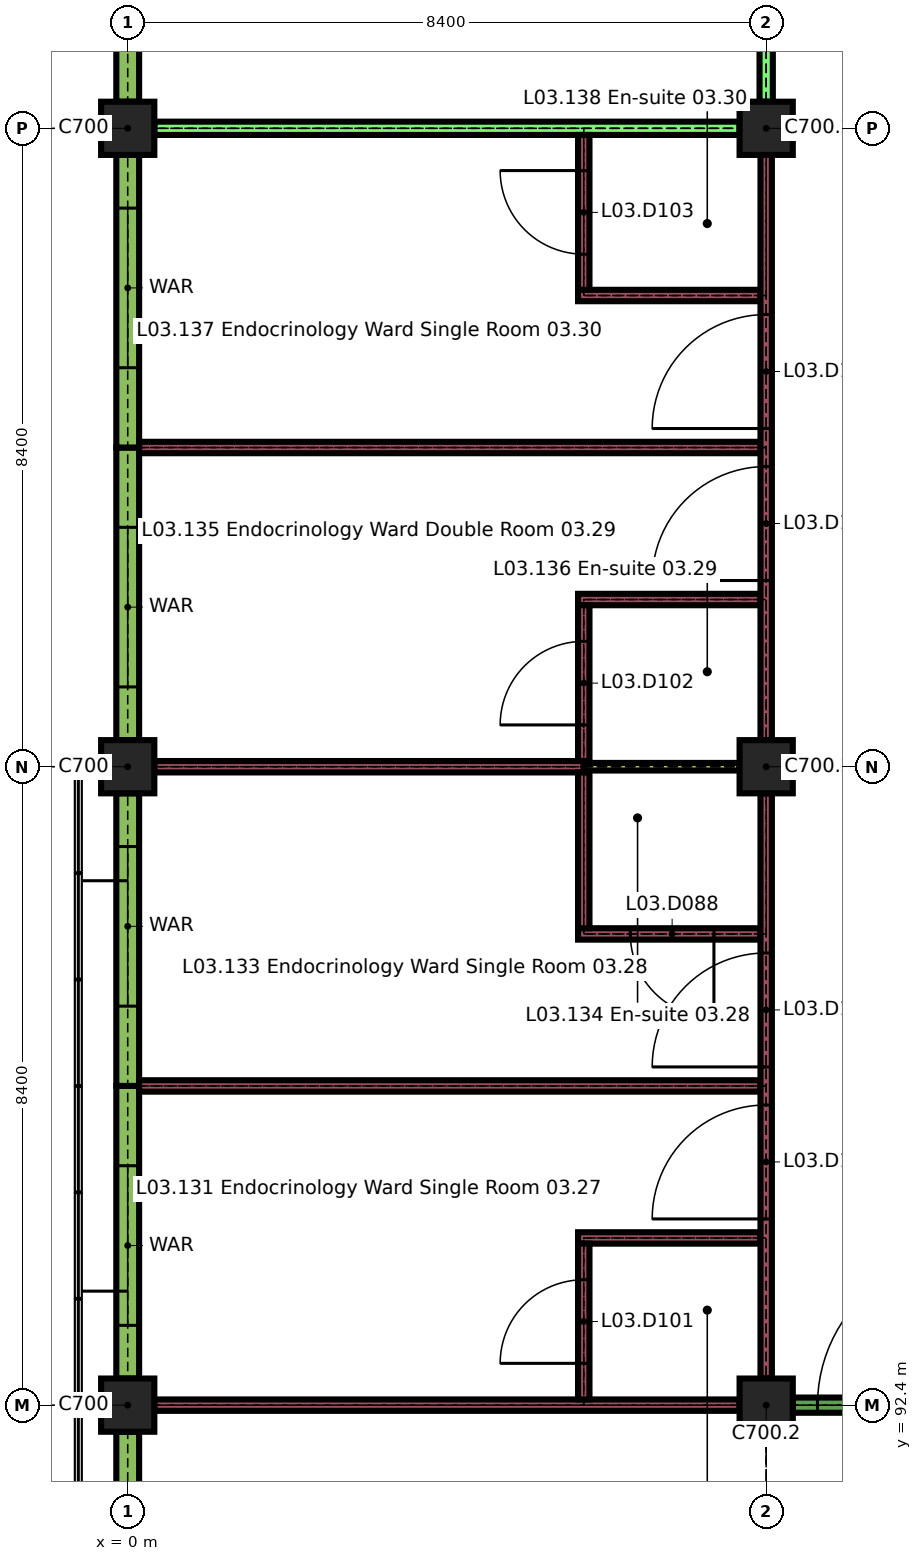
"""IFC4 building model, lengths in metres.
Left out: names, types, materials, properties, quantities, classifications, styles, units other than length and angle.
Written with IfcOpenShell. Run it as: python <this file> out.ifc"""

import sys

from ifc_helpers import new_model, si_unit, direction, frame, frame_2d, origin, origin_2d, place, context, subcontext, project, spatial, rectangle, extrude, element, fill, save


model = new_model("IFC4")
c1 = context("Model", 3, precision=1e-05, world=origin(), true_north=direction((0.0, 1.0)))
c2 = subcontext(c1, "Body", "Model", "MODEL_VIEW")
j1 = project(units=[si_unit("LENGTHUNIT", "METRE"), si_unit("PLANEANGLEUNIT", "RADIAN")], contexts=[c1])
p1 = place(None, origin())
s1 = spatial("IfcSite", under=j1, at=p1, CompositionType="ELEMENT")
p2 = place(p1, origin())
s2 = spatial("IfcBuilding", under=s1, at=p2, CompositionType="ELEMENT")
p3 = place(p2, frame((0.0, 0.0, 15.3)))
s3 = spatial("IfcBuildingStorey", under=s2, at=p3, CompositionType="ELEMENT", Elevation=15.3)
for number, where, z_axis, x_axis in (
    (1, (0.0, 92.4, 0.0), (0.0, 0.0, 1.0), (1.0, 0.0, 0.0)),
    (2, (8.4, 92.4, 0.0), (0.0, 0.0, 1.0), (1.0, 0.0, 0.0)),
    (3, (0.0, 100.8, 0.0), (0.0, 0.0, 1.0), (1.0, 0.0, 0.0)),
    (4, (8.4, 100.8, 0.0), (0.0, 0.0, 1.0), (1.0, 0.0, 0.0)),
    (5, (0.0, 109.2, 0.0), (0.0, 0.0, 1.0), (1.0, 0.0, 0.0)),
    (6, (8.4, 109.2, 0.0), (0.0, 0.0, 1.0), (1.0, 0.0, 0.0)),
):
    element("IfcColumn", number, at=place(p3, frame(where, z_axis=z_axis, x_axis=x_axis)), inside=s3, PredefinedType="COLUMN", context=c2, shape_type="SweptSolid", body=[
        extrude(rectangle(XDim=0.7, YDim=0.7, at=origin_2d()), origin(), (0.0, 0.0, 1.0), 3.26),
    ])
p4 = place(p3, frame((0.0, 91.0, 0.0), z_axis=(0.0, 0.0, 1.0), x_axis=(0.0, 1.0, 0.0)))
e7 = element("IfcWall", 7, at=p4, inside=s3, PredefinedType="SOLIDWALL", context=c2, shape_type="SweptSolid", body=[
    extrude(rectangle(XDim=1.05, YDim=0.3, at=frame_2d((0.525, 0.0))), origin(), (0.0, 0.0, 1.0), 2.96),
])
p5 = place(p3, frame((0.0, 92.75, 0.0), z_axis=(0.0, 0.0, 1.0), x_axis=(0.0, 1.0, 0.0)))
e8 = element("IfcWall", 8, at=p5, inside=s3, PredefinedType="SOLIDWALL", context=c2, shape_type="SweptSolid", body=[
    extrude(rectangle(XDim=3.85, YDim=0.3, at=frame_2d((1.925, 0.0))), origin(), (0.0, 0.0, 1.0), 2.96),
])
p6 = place(p5, frame((0.7, 0.0, 0.9)))
e9 = element("IfcOpeningElement", 9, at=p6, cuts=e8, PredefinedType="OPENING", context=c2, shape_type="SweptSolid", body=[
    extrude(rectangle(XDim=2.1, YDim=1.5, at=frame_2d((1.05, 0.75))), frame((0.0, 0.16, 0.0), z_axis=(0.0, -1.0, 0.0), x_axis=(1.0, 0.0, 0.0)), (0.0, 0.0, 1.0), 0.32),
])
p7 = place(p3, frame((0.0, 96.6, 0.0), z_axis=(0.0, 0.0, 1.0), x_axis=(0.0, 1.0, 0.0)))
e10 = element("IfcWall", 10, at=p7, inside=s3, PredefinedType="SOLIDWALL", context=c2, shape_type="SweptSolid", body=[
    extrude(rectangle(XDim=3.85, YDim=0.3, at=frame_2d((1.925, 0.0))), origin(), (0.0, 0.0, 1.0), 2.96),
])
p8 = place(p7, frame((1.05, 0.0, 0.9)))
e11 = element("IfcOpeningElement", 11, at=p8, cuts=e10, PredefinedType="OPENING", context=c2, shape_type="SweptSolid", body=[
    extrude(rectangle(XDim=2.1, YDim=1.5, at=frame_2d((1.05, 0.75))), frame((0.0, 0.16, 0.0), z_axis=(0.0, -1.0, 0.0), x_axis=(1.0, 0.0, 0.0)), (0.0, 0.0, 1.0), 0.32),
])
p9 = place(p3, frame((0.0, 101.15, 0.0), z_axis=(0.0, 0.0, 1.0), x_axis=(0.0, 1.0, 0.0)))
e12 = element("IfcWall", 12, at=p9, inside=s3, PredefinedType="SOLIDWALL", context=c2, shape_type="SweptSolid", body=[
    extrude(rectangle(XDim=3.85, YDim=0.3, at=frame_2d((1.925, 0.0))), origin(), (0.0, 0.0, 1.0), 2.96),
])
p10 = place(p9, frame((0.7, 0.0, 0.9)))
e13 = element("IfcOpeningElement", 13, at=p10, cuts=e12, PredefinedType="OPENING", context=c2, shape_type="SweptSolid", body=[
    extrude(rectangle(XDim=2.1, YDim=1.5, at=frame_2d((1.05, 0.75))), frame((0.0, 0.16, 0.0), z_axis=(0.0, -1.0, 0.0), x_axis=(1.0, 0.0, 0.0)), (0.0, 0.0, 1.0), 0.32),
])
p11 = place(p3, frame((0.0, 105.0, 0.0), z_axis=(0.0, 0.0, 1.0), x_axis=(0.0, 1.0, 0.0)))
e14 = element("IfcWall", 14, at=p11, inside=s3, PredefinedType="SOLIDWALL", context=c2, shape_type="SweptSolid", body=[
    extrude(rectangle(XDim=3.85, YDim=0.3, at=frame_2d((1.925, 0.0))), origin(), (0.0, 0.0, 1.0), 2.96),
])
p12 = place(p11, frame((1.05, 0.0, 0.9)))
e15 = element("IfcOpeningElement", 15, at=p12, cuts=e14, PredefinedType="OPENING", context=c2, shape_type="SweptSolid", body=[
    extrude(rectangle(XDim=2.1, YDim=1.5, at=frame_2d((1.05, 0.75))), frame((0.0, 0.16, 0.0), z_axis=(0.0, -1.0, 0.0), x_axis=(1.0, 0.0, 0.0)), (0.0, 0.0, 1.0), 0.32),
])
p13 = place(p3, frame((0.0, 109.55, 0.0), z_axis=(0.0, 0.0, 1.0), x_axis=(0.0, 1.0, 0.0)))
e16 = element("IfcWall", 16, at=p13, inside=s3, PredefinedType="SOLIDWALL", context=c2, shape_type="SweptSolid", body=[
    extrude(rectangle(XDim=3.85, YDim=0.3, at=frame_2d((1.925, 0.0))), origin(), (0.0, 0.0, 1.0), 2.96),
])
p14 = place(p13, frame((1.0, 0.0, 0.9)))
e17 = element("IfcOpeningElement", 17, at=p14, cuts=e16, PredefinedType="OPENING", context=c2, shape_type="SweptSolid", body=[
    extrude(rectangle(XDim=1.5, YDim=1.5, at=frame_2d((0.75, 0.75))), frame((0.0, 0.16, 0.0), z_axis=(0.0, -1.0, 0.0), x_axis=(1.0, 0.0, 0.0)), (0.0, 0.0, 1.0), 0.32),
])
p15 = place(p3, frame((0.35, 92.4, 0.0), z_axis=(0.0, 0.0, 1.0), x_axis=(1.0, 0.0, 0.0)))
e18 = element("IfcWall", 18, at=p15, inside=s3, PredefinedType="PARTITIONING", context=c2, shape_type="SweptSolid", body=[
    extrude(rectangle(XDim=7.7, YDim=0.15, at=frame_2d((3.85, 0.0))), origin(), (0.0, 0.0, 1.0), 3.26),
])
p16 = place(p3, frame((8.75, 92.4, 0.0), z_axis=(0.0, 0.0, 1.0), x_axis=(1.0, 0.0, 0.0)))
e19 = element("IfcWall", 19, at=p16, inside=s3, PredefinedType="PARTITIONING", context=c2, shape_type="SweptSolid", body=[
    extrude(rectangle(XDim=7.7, YDim=0.2, at=frame_2d((3.85, 0.0))), origin(), (0.0, 0.0, 1.0), 3.26),
])
p17 = place(p16, frame((0.325, 0.0, 0.0)))
e20 = element("IfcOpeningElement", 20, at=p17, cuts=e19, PredefinedType="OPENING", context=c2, shape_type="SweptSolid", body=[
    extrude(rectangle(XDim=2.0, YDim=2.4, at=frame_2d((1.0, 1.2))), frame((0.0, 0.11, 0.0), z_axis=(0.0, -1.0, 0.0), x_axis=(1.0, 0.0, 0.0)), (0.0, 0.0, 1.0), 0.22),
])
p18 = place(p16, frame((5.375, 0.0, 0.0)))
e21 = element("IfcOpeningElement", 21, at=p18, cuts=e19, PredefinedType="OPENING", context=c2, shape_type="SweptSolid", body=[
    extrude(rectangle(XDim=2.0, YDim=2.4, at=frame_2d((1.0, 1.2))), frame((0.0, 0.11, 0.0), z_axis=(0.0, -1.0, 0.0), x_axis=(1.0, 0.0, 0.0)), (0.0, 0.0, 1.0), 0.22),
])
p19 = place(p3, frame((5.925, 94.6, 0.0), z_axis=(0.0, 0.0, 1.0), x_axis=(1.0, 0.0, 0.0)))
e22 = element("IfcWall", 22, at=p19, inside=s3, PredefinedType="PARTITIONING", context=c2, shape_type="SweptSolid", body=[
    extrude(rectangle(XDim=2.4, YDim=0.15, at=frame_2d((1.2, 0.0))), origin(), (0.0, 0.0, 1.0), 3.26),
])
p20 = place(p3, frame((0.15, 96.6, 0.0), z_axis=(0.0, 0.0, 1.0), x_axis=(1.0, 0.0, 0.0)))
e23 = element("IfcWall", 23, at=p20, inside=s3, PredefinedType="PARTITIONING", context=c2, shape_type="SweptSolid", body=[
    extrude(rectangle(XDim=8.175, YDim=0.15, at=frame_2d((4.087, 0.0))), origin(), (0.0, 0.0, 1.0), 3.26),
])
p21 = place(p3, frame((5.925, 98.6, 0.0), z_axis=(0.0, 0.0, 1.0), x_axis=(1.0, 0.0, 0.0)))
e24 = element("IfcWall", 24, at=p21, inside=s3, PredefinedType="PARTITIONING", context=c2, shape_type="SweptSolid", body=[
    extrude(rectangle(XDim=2.4, YDim=0.15, at=frame_2d((1.2, 0.0))), origin(), (0.0, 0.0, 1.0), 3.26),
])
p22 = place(p21, frame((0.688, 0.0, 0.0)))
e25 = element("IfcOpeningElement", 25, at=p22, cuts=e24, PredefinedType="OPENING", context=c2, shape_type="SweptSolid", body=[
    extrude(rectangle(XDim=1.1, YDim=2.1, at=frame_2d((0.55, 1.05))), frame((0.0, 0.085, 0.0), z_axis=(0.0, -1.0, 0.0), x_axis=(1.0, 0.0, 0.0)), (0.0, 0.0, 1.0), 0.17),
])
p23 = place(p3, frame((0.35, 100.8, 0.0), z_axis=(0.0, 0.0, 1.0), x_axis=(1.0, 0.0, 0.0)))
e26 = element("IfcWall", 26, at=p23, inside=s3, PredefinedType="PARTITIONING", context=c2, shape_type="SweptSolid", body=[
    extrude(rectangle(XDim=5.65, YDim=0.15, at=frame_2d((2.825, 0.0))), origin(), (0.0, 0.0, 1.0), 3.26),
])
p24 = place(p3, frame((6.0, 100.8, 0.0), z_axis=(0.0, 0.0, 1.0), x_axis=(1.0, 0.0, 0.0)))
e27 = element("IfcWall", 27, at=p24, inside=s3, PredefinedType="PARTITIONING", context=c2, shape_type="SweptSolid", body=[
    extrude(rectangle(XDim=2.05, YDim=0.1, at=frame_2d((1.025, 0.0))), origin(), (0.0, 0.0, 1.0), 3.26),
])
p25 = place(p3, frame((5.925, 103.0, 0.0), z_axis=(0.0, 0.0, 1.0), x_axis=(1.0, 0.0, 0.0)))
e28 = element("IfcWall", 28, at=p25, inside=s3, PredefinedType="PARTITIONING", context=c2, shape_type="SweptSolid", body=[
    extrude(rectangle(XDim=2.4, YDim=0.15, at=frame_2d((1.2, 0.0))), origin(), (0.0, 0.0, 1.0), 3.26),
])
p26 = place(p3, frame((0.15, 105.0, 0.0), z_axis=(0.0, 0.0, 1.0), x_axis=(1.0, 0.0, 0.0)))
e29 = element("IfcWall", 29, at=p26, inside=s3, PredefinedType="PARTITIONING", context=c2, shape_type="SweptSolid", body=[
    extrude(rectangle(XDim=8.175, YDim=0.15, at=frame_2d((4.087, 0.0))), origin(), (0.0, 0.0, 1.0), 3.26),
])
p27 = place(p3, frame((5.925, 107.0, 0.0), z_axis=(0.0, 0.0, 1.0), x_axis=(1.0, 0.0, 0.0)))
e30 = element("IfcWall", 30, at=p27, inside=s3, PredefinedType="PARTITIONING", context=c2, shape_type="SweptSolid", body=[
    extrude(rectangle(XDim=2.4, YDim=0.15, at=frame_2d((1.2, 0.0))), origin(), (0.0, 0.0, 1.0), 3.26),
])
p28 = place(p3, frame((0.35, 109.2, 0.0), z_axis=(0.0, 0.0, 1.0), x_axis=(1.0, 0.0, 0.0)))
e31 = element("IfcWall", 31, at=p28, inside=s3, PredefinedType="PARTITIONING", context=c2, shape_type="SweptSolid", body=[
    extrude(rectangle(XDim=7.7, YDim=0.175, at=frame_2d((3.85, 0.0))), origin(), (0.0, 0.0, 1.0), 3.26),
])
p29 = place(p3, frame((6.0, 92.475, 0.0), z_axis=(0.0, 0.0, 1.0), x_axis=(0.0, 1.0, 0.0)))
e32 = element("IfcWall", 32, at=p29, inside=s3, PredefinedType="PARTITIONING", context=c2, shape_type="SweptSolid", body=[
    extrude(rectangle(XDim=2.05, YDim=0.15, at=frame_2d((1.025, 0.0))), origin(), (0.0, 0.0, 1.0), 3.26),
])
p30 = place(p29, frame((0.475, 0.0, 0.0)))
e33 = element("IfcOpeningElement", 33, at=p30, cuts=e32, PredefinedType="OPENING", context=c2, shape_type="SweptSolid", body=[
    extrude(rectangle(XDim=1.1, YDim=2.1, at=frame_2d((0.55, 1.05))), frame((0.0, 0.085, 0.0), z_axis=(0.0, -1.0, 0.0), x_axis=(1.0, 0.0, 0.0)), (0.0, 0.0, 1.0), 0.17),
])
p31 = place(p3, frame((6.0, 98.675, 0.0), z_axis=(0.0, 0.0, 1.0), x_axis=(0.0, 1.0, 0.0)))
e34 = element("IfcWall", 34, at=p31, inside=s3, PredefinedType="PARTITIONING", context=c2, shape_type="SweptSolid", body=[
    extrude(rectangle(XDim=2.05, YDim=0.15, at=frame_2d((1.025, 0.0))), origin(), (0.0, 0.0, 1.0), 3.26),
])
p32 = place(p3, frame((6.0, 100.875, 0.0), z_axis=(0.0, 0.0, 1.0), x_axis=(0.0, 1.0, 0.0)))
e35 = element("IfcWall", 35, at=p32, inside=s3, PredefinedType="PARTITIONING", context=c2, shape_type="SweptSolid", body=[
    extrude(rectangle(XDim=2.05, YDim=0.15, at=frame_2d((1.025, 0.0))), origin(), (0.0, 0.0, 1.0), 3.26),
])
p33 = place(p32, frame((0.475, 0.0, 0.0)))
e36 = element("IfcOpeningElement", 36, at=p33, cuts=e35, PredefinedType="OPENING", context=c2, shape_type="SweptSolid", body=[
    extrude(rectangle(XDim=1.1, YDim=2.1, at=frame_2d((0.55, 1.05))), frame((0.0, 0.085, 0.0), z_axis=(0.0, -1.0, 0.0), x_axis=(1.0, 0.0, 0.0)), (0.0, 0.0, 1.0), 0.17),
])
p34 = place(p3, frame((6.0, 107.075, 0.0), z_axis=(0.0, 0.0, 1.0), x_axis=(0.0, 1.0, 0.0)))
e37 = element("IfcWall", 37, at=p34, inside=s3, PredefinedType="PARTITIONING", context=c2, shape_type="SweptSolid", body=[
    extrude(rectangle(XDim=2.038, YDim=0.15, at=frame_2d((1.019, 0.0))), origin(), (0.0, 0.0, 1.0), 3.26),
])
p35 = place(p34, frame((0.469, 0.0, 0.0)))
e38 = element("IfcOpeningElement", 38, at=p35, cuts=e37, PredefinedType="OPENING", context=c2, shape_type="SweptSolid", body=[
    extrude(rectangle(XDim=1.1, YDim=2.1, at=frame_2d((0.55, 1.05))), frame((0.0, 0.085, 0.0), z_axis=(0.0, -1.0, 0.0), x_axis=(1.0, 0.0, 0.0)), (0.0, 0.0, 1.0), 0.17),
])
p36 = place(p3, frame((8.4, 92.75, 0.0), z_axis=(0.0, 0.0, 1.0), x_axis=(0.0, 1.0, 0.0)))
e39 = element("IfcWall", 39, at=p36, inside=s3, PredefinedType="PARTITIONING", context=c2, shape_type="SweptSolid", body=[
    extrude(rectangle(XDim=7.7, YDim=0.15, at=frame_2d((3.85, 0.0))), origin(), (0.0, 0.0, 1.0), 3.26),
])
p37 = place(p36, frame((2.1, 0.0, 0.0)))
e40 = element("IfcOpeningElement", 40, at=p37, cuts=e39, PredefinedType="OPENING", context=c2, shape_type="SweptSolid", body=[
    extrude(rectangle(XDim=1.5, YDim=2.4, at=frame_2d((0.75, 1.2))), frame((0.0, 0.085, 0.0), z_axis=(0.0, -1.0, 0.0), x_axis=(1.0, 0.0, 0.0)), (0.0, 0.0, 1.0), 0.17),
])
p38 = place(p36, frame((4.1, 0.0, 0.0)))
e41 = element("IfcOpeningElement", 41, at=p38, cuts=e39, PredefinedType="OPENING", context=c2, shape_type="SweptSolid", body=[
    extrude(rectangle(XDim=1.5, YDim=2.4, at=frame_2d((0.75, 1.2))), frame((0.0, 0.085, 0.0), z_axis=(0.0, -1.0, 0.0), x_axis=(1.0, 0.0, 0.0)), (0.0, 0.0, 1.0), 0.17),
])
p39 = place(p3, frame((8.4, 101.15, 0.0), z_axis=(0.0, 0.0, 1.0), x_axis=(0.0, 1.0, 0.0)))
e42 = element("IfcWall", 42, at=p39, inside=s3, PredefinedType="PARTITIONING", context=c2, shape_type="SweptSolid", body=[
    extrude(rectangle(XDim=7.7, YDim=0.15, at=frame_2d((3.85, 0.0))), origin(), (0.0, 0.0, 1.0), 3.26),
])
p40 = place(p39, frame((2.1, 0.0, 0.0)))
e43 = element("IfcOpeningElement", 43, at=p40, cuts=e42, PredefinedType="OPENING", context=c2, shape_type="SweptSolid", body=[
    extrude(rectangle(XDim=1.5, YDim=2.4, at=frame_2d((0.75, 1.2))), frame((0.0, 0.085, 0.0), z_axis=(0.0, -1.0, 0.0), x_axis=(1.0, 0.0, 0.0)), (0.0, 0.0, 1.0), 0.17),
])
p41 = place(p39, frame((4.1, 0.0, 0.0)))
e44 = element("IfcOpeningElement", 44, at=p41, cuts=e42, PredefinedType="OPENING", context=c2, shape_type="SweptSolid", body=[
    extrude(rectangle(XDim=1.5, YDim=2.4, at=frame_2d((0.75, 1.2))), frame((0.0, 0.085, 0.0), z_axis=(0.0, -1.0, 0.0), x_axis=(1.0, 0.0, 0.0)), (0.0, 0.0, 1.0), 0.17),
])
p42 = place(p3, frame((8.4, 109.55, 0.0), z_axis=(0.0, 0.0, 1.0), x_axis=(0.0, 1.0, 0.0)))
e45 = element("IfcWall", 45, at=p42, inside=s3, PredefinedType="PARTITIONING", context=c2, shape_type="SweptSolid", body=[
    extrude(rectangle(XDim=3.762, YDim=0.175, at=frame_2d((1.881, 0.0))), origin(), (0.0, 0.0, 1.0), 3.26),
])
p43 = place(p42, frame((1.331, 0.0, 0.0)))
e46 = element("IfcOpeningElement", 46, at=p43, cuts=e45, PredefinedType="OPENING", context=c2, shape_type="SweptSolid", body=[
    extrude(rectangle(XDim=1.1, YDim=2.1, at=frame_2d((0.55, 1.05))), frame((0.0, 0.097, 0.0), z_axis=(0.0, -1.0, 0.0), x_axis=(1.0, 0.0, 0.0)), (0.0, 0.0, 1.0), 0.195),
])
p44 = place(p6, origin())
e47 = element("IfcWindow", 47, at=p44, inside=s3, PartitioningType="DOUBLE_PANEL_VERTICAL", PredefinedType="WINDOW", context=c2, shape_type="SweptSolid", body=[
    extrude(rectangle(XDim=2.1, YDim=1.5, at=frame_2d((1.05, 0.75))), frame((0.0, 0.05, 0.0), z_axis=(0.0, -1.0, 0.0), x_axis=(1.0, 0.0, 0.0)), (0.0, 0.0, 1.0), 0.1),
])
fill(e9, e47)
p45 = place(p8, origin())
e48 = element("IfcWindow", 48, at=p45, inside=s3, PartitioningType="DOUBLE_PANEL_VERTICAL", PredefinedType="WINDOW", context=c2, shape_type="SweptSolid", body=[
    extrude(rectangle(XDim=2.1, YDim=1.5, at=frame_2d((1.05, 0.75))), frame((0.0, 0.05, 0.0), z_axis=(0.0, -1.0, 0.0), x_axis=(1.0, 0.0, 0.0)), (0.0, 0.0, 1.0), 0.1),
])
fill(e11, e48)
p46 = place(p10, origin())
e49 = element("IfcWindow", 49, at=p46, inside=s3, PartitioningType="DOUBLE_PANEL_VERTICAL", PredefinedType="WINDOW", context=c2, shape_type="SweptSolid", body=[
    extrude(rectangle(XDim=2.1, YDim=1.5, at=frame_2d((1.05, 0.75))), frame((0.0, 0.05, 0.0), z_axis=(0.0, -1.0, 0.0), x_axis=(1.0, 0.0, 0.0)), (0.0, 0.0, 1.0), 0.1),
])
fill(e13, e49)
p47 = place(p12, origin())
e50 = element("IfcWindow", 50, at=p47, inside=s3, PartitioningType="DOUBLE_PANEL_VERTICAL", PredefinedType="WINDOW", context=c2, shape_type="SweptSolid", body=[
    extrude(rectangle(XDim=2.1, YDim=1.5, at=frame_2d((1.05, 0.75))), frame((0.0, 0.05, 0.0), z_axis=(0.0, -1.0, 0.0), x_axis=(1.0, 0.0, 0.0)), (0.0, 0.0, 1.0), 0.1),
])
fill(e15, e50)
p48 = place(p17, origin())
e51 = element("IfcDoor", 51, at=p48, inside=s3, OperationType="SINGLE_SWING_LEFT", PredefinedType="DOOR", context=c2, shape_type="SweptSolid", body=[
    extrude(rectangle(XDim=2.0, YDim=2.4, at=frame_2d((1.0, 1.2))), frame((0.0, 0.03, 0.0), z_axis=(0.0, -1.0, 0.0), x_axis=(1.0, 0.0, 0.0)), (0.0, 0.0, 1.0), 0.06),
])
fill(e20, e51)
p49 = place(p22, origin())
e52 = element("IfcDoor", 52, at=p49, inside=s3, OperationType="SINGLE_SWING_RIGHT", PredefinedType="DOOR", context=c2, shape_type="SweptSolid", body=[
    extrude(rectangle(XDim=1.1, YDim=2.1, at=frame_2d((0.55, 1.05))), frame((0.0, 0.025, 0.0), z_axis=(0.0, -1.0, 0.0), x_axis=(1.0, 0.0, 0.0)), (0.0, 0.0, 1.0), 0.05),
])
fill(e25, e52)
p50 = place(p30, origin())
e53 = element("IfcDoor", 53, at=p50, inside=s3, OperationType="SINGLE_SWING_RIGHT", PredefinedType="DOOR", context=c2, shape_type="SweptSolid", body=[
    extrude(rectangle(XDim=1.1, YDim=2.1, at=frame_2d((0.55, 1.05))), frame((0.0, 0.025, 0.0), z_axis=(0.0, -1.0, 0.0), x_axis=(1.0, 0.0, 0.0)), (0.0, 0.0, 1.0), 0.05),
])
fill(e33, e53)
p51 = place(p33, origin())
e54 = element("IfcDoor", 54, at=p51, inside=s3, OperationType="SINGLE_SWING_RIGHT", PredefinedType="DOOR", context=c2, shape_type="SweptSolid", body=[
    extrude(rectangle(XDim=1.1, YDim=2.1, at=frame_2d((0.55, 1.05))), frame((0.0, 0.025, 0.0), z_axis=(0.0, -1.0, 0.0), x_axis=(1.0, 0.0, 0.0)), (0.0, 0.0, 1.0), 0.05),
])
fill(e36, e54)
p52 = place(p35, origin())
e55 = element("IfcDoor", 55, at=p52, inside=s3, OperationType="SINGLE_SWING_LEFT", PredefinedType="DOOR", context=c2, shape_type="SweptSolid", body=[
    extrude(rectangle(XDim=1.1, YDim=2.1, at=frame_2d((0.55, 1.05))), frame((0.0, 0.025, 0.0), z_axis=(0.0, -1.0, 0.0), x_axis=(1.0, 0.0, 0.0)), (0.0, 0.0, 1.0), 0.05),
])
fill(e38, e55)
p53 = place(p37, origin())
e56 = element("IfcDoor", 56, at=p53, inside=s3, OperationType="SINGLE_SWING_RIGHT", PredefinedType="DOOR", context=c2, shape_type="SweptSolid", body=[
    extrude(rectangle(XDim=1.5, YDim=2.4, at=frame_2d((0.75, 1.2))), frame((0.0, 0.03, 0.0), z_axis=(0.0, -1.0, 0.0), x_axis=(1.0, 0.0, 0.0)), (0.0, 0.0, 1.0), 0.06),
])
fill(e40, e56)
p54 = place(p38, origin())
e57 = element("IfcDoor", 57, at=p54, inside=s3, OperationType="SINGLE_SWING_RIGHT", PredefinedType="DOOR", context=c2, shape_type="SweptSolid", body=[
    extrude(rectangle(XDim=1.5, YDim=2.4, at=frame_2d((0.75, 1.2))), frame((0.0, 0.03, 0.0), z_axis=(0.0, -1.0, 0.0), x_axis=(1.0, 0.0, 0.0)), (0.0, 0.0, 1.0), 0.06),
])
fill(e41, e57)
p55 = place(p40, origin())
e58 = element("IfcDoor", 58, at=p55, inside=s3, OperationType="SINGLE_SWING_RIGHT", PredefinedType="DOOR", context=c2, shape_type="SweptSolid", body=[
    extrude(rectangle(XDim=1.5, YDim=2.4, at=frame_2d((0.75, 1.2))), frame((0.0, 0.03, 0.0), z_axis=(0.0, -1.0, 0.0), x_axis=(1.0, 0.0, 0.0)), (0.0, 0.0, 1.0), 0.06),
])
fill(e43, e58)
p56 = place(p41, origin())
e59 = element("IfcDoor", 59, at=p56, inside=s3, OperationType="SINGLE_SWING_RIGHT", PredefinedType="DOOR", context=c2, shape_type="SweptSolid", body=[
    extrude(rectangle(XDim=1.5, YDim=2.4, at=frame_2d((0.75, 1.2))), frame((0.0, 0.03, 0.0), z_axis=(0.0, -1.0, 0.0), x_axis=(1.0, 0.0, 0.0)), (0.0, 0.0, 1.0), 0.06),
])
fill(e44, e59)
save(model, sys.argv[1])
